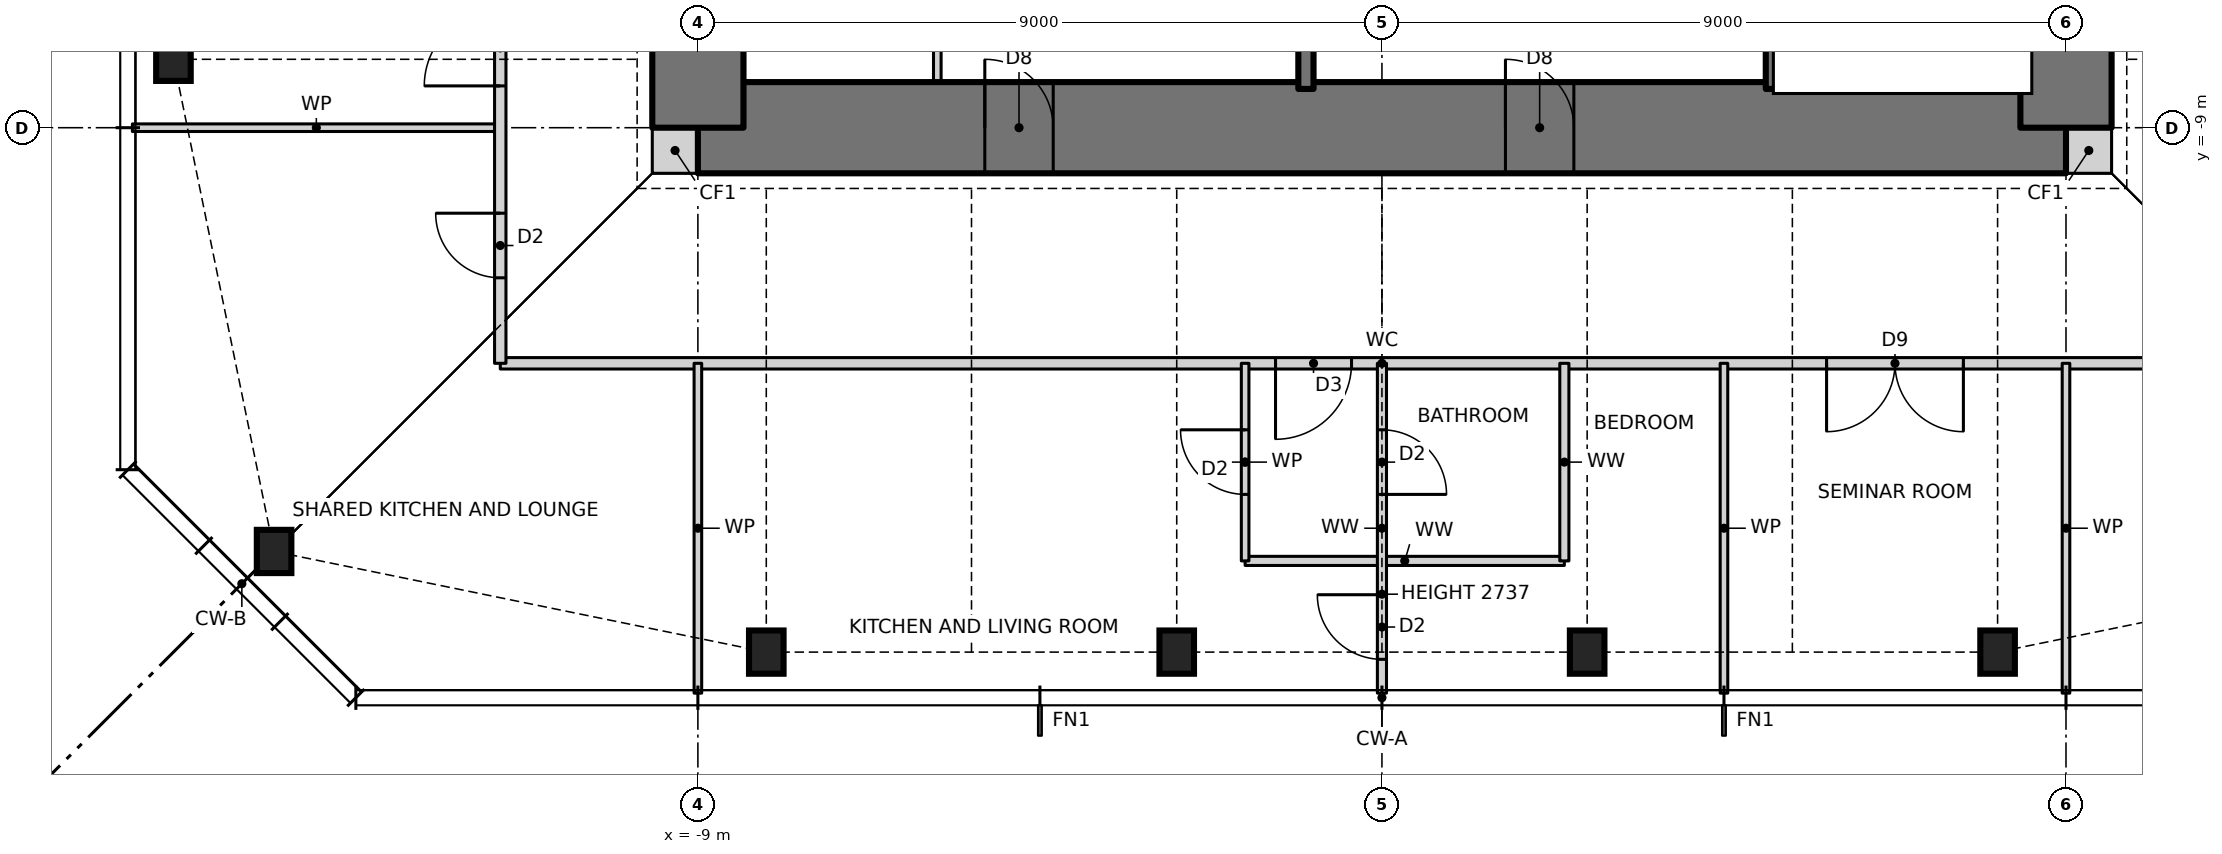
"""IFC4 building model, lengths in metres.
Left out: names, types, materials, properties, quantities, classifications, styles, units other than length and angle.
Written with IfcOpenShell. Run it as: python <this file> out.ifc"""

import sys

from ifc_helpers import new_model, si_unit, direction, frame, frame_2d, origin, origin_2d, place, context, subcontext, project, spatial, rectangle, i_section, extrude, element, fill, save


model = new_model("IFC4")
c1 = context("Model", 3, precision=1e-05, world=origin(), true_north=direction((0.0, 1.0)))
c2 = subcontext(c1, "Body", "Model", "MODEL_VIEW")
j1 = project(units=[si_unit("LENGTHUNIT", "METRE"), si_unit("PLANEANGLEUNIT", "RADIAN")], contexts=[c1])
p1 = place(None, origin())
s1 = spatial("IfcSite", under=j1, at=p1, CompositionType="ELEMENT")
p2 = place(p1, origin())
s2 = spatial("IfcBuilding", under=s1, at=p2, CompositionType="ELEMENT")
p3 = place(p2, frame((0.0, 0.0, 232.5)))
s3 = spatial("IfcBuildingStorey", under=s2, at=p3, CompositionType="ELEMENT", Elevation=232.5)
for number, where, z_axis, x_axis in (
    (1, (-14.576, -14.576, 0.0), (0.0, 0.0, 1.0), (1.0, 0.0, 0.0)),
    (2, (-8.1, -15.9, 0.0), (0.0, 0.0, 1.0), (1.0, 0.0, 0.0)),
    (3, (-2.7, -15.9, 0.0), (0.0, 0.0, 1.0), (1.0, 0.0, 0.0)),
    (4, (2.7, -15.9, 0.0), (0.0, 0.0, 1.0), (1.0, 0.0, 0.0)),
    (5, (8.1, -15.9, 0.0), (0.0, 0.0, 1.0), (1.0, 0.0, 0.0)),
    (6, (-15.9, -8.1, 0.0), (0.0, 0.0, 1.0), (1.0, 0.0, 0.0)),
):
    element("IfcColumn", number, at=place(p3, frame(where, z_axis=z_axis, x_axis=x_axis)), inside=s3, PredefinedType="COLUMN", context=c2, shape_type="SweptSolid", body=[
        extrude(i_section(OverallWidth=0.455, OverallDepth=0.569, WebThickness=0.078, FlangeThickness=0.125, at=origin_2d()), origin(), (0.0, 0.0, 1.0), 3.5),
    ])
for number, where, z_axis, x_axis in (
    (7, (-9.6, -9.3, 0.0), (0.0, 0.0, 1.0), (1.0, 0.0, 0.0)),
    (8, (9.0, -9.3, 0.0), (0.0, 0.0, 1.0), (1.0, 0.0, 0.0)),
):
    element("IfcWall", number, at=place(p3, frame(where, z_axis=z_axis, x_axis=x_axis)), inside=s3, PredefinedType="SOLIDWALL", context=c2, shape_type="SweptSolid", body=[
        extrude(rectangle(XDim=0.6, YDim=0.6, at=frame_2d((0.3, 0.0))), origin(), (0.0, 0.0, 1.0), 3.5),
    ])
p4 = place(p3, frame((-9.0, -9.0, 0.0), z_axis=(0.0, 0.0, 1.0), x_axis=(1.0, 0.0, 0.0)))
e9 = element("IfcWall", 9, at=p4, inside=s3, PredefinedType="SHEAR", context=c2, shape_type="SweptSolid", body=[
    extrude(rectangle(XDim=18.0, YDim=1.2, at=frame_2d((9.0, 0.0))), origin(), (0.0, 0.0, 1.0), 3.5),
])
p5 = place(p4, frame((3.775, 0.0, 0.0)))
e10 = element("IfcOpeningElement", 10, at=p5, cuts=e9, PredefinedType="OPENING", context=c2, shape_type="SweptSolid", body=[
    extrude(rectangle(XDim=0.9, YDim=2.1, at=frame_2d((0.45, 1.05))), frame((0.0, 0.61, 0.0), z_axis=(0.0, -1.0, 0.0), x_axis=(1.0, 0.0, 0.0)), (0.0, 0.0, 1.0), 1.22),
])
p6 = place(p4, frame((10.625, 0.0, 0.0)))
e11 = element("IfcOpeningElement", 11, at=p6, cuts=e9, PredefinedType="OPENING", context=c2, shape_type="SweptSolid", body=[
    extrude(rectangle(XDim=0.9, YDim=2.1, at=frame_2d((0.45, 1.05))), frame((0.0, 0.61, 0.0), z_axis=(0.0, -1.0, 0.0), x_axis=(1.0, 0.0, 0.0)), (0.0, 0.0, 1.0), 1.22),
])
p7 = place(p3, frame((9.0, -9.0, 0.0), z_axis=(0.0, 0.0, 1.0), x_axis=(0.0, 1.0, 0.0)))
e12 = element("IfcWall", 12, at=p7, inside=s3, PredefinedType="SHEAR", context=c2, shape_type="SweptSolid", body=[
    extrude(rectangle(XDim=18.0, YDim=1.2, at=frame_2d((9.0, 0.0))), origin(), (0.0, 0.0, 1.0), 3.5),
])
p8 = place(p7, frame((8.5, 0.0, 0.0)))
e13 = element("IfcOpeningElement", 13, at=p8, cuts=e12, PredefinedType="OPENING", context=c2, shape_type="SweptSolid", body=[
    extrude(rectangle(XDim=1.0, YDim=2.1, at=frame_2d((0.5, 1.05))), frame((0.0, 0.61, 0.0), z_axis=(0.0, -1.0, 0.0), x_axis=(1.0, 0.0, 0.0)), (0.0, 0.0, 1.0), 1.22),
])
p9 = place(p3, frame((-9.0, 9.0, 0.0), z_axis=(0.0, 0.0, 1.0), x_axis=(0.0, -1.0, 0.0)))
e14 = element("IfcWall", 14, at=p9, inside=s3, PredefinedType="SHEAR", context=c2, shape_type="SweptSolid", body=[
    extrude(rectangle(XDim=18.0, YDim=1.2, at=frame_2d((9.0, 0.0))), origin(), (0.0, 0.0, 1.0), 3.5),
])
p10 = place(p9, frame((8.5, 0.0, 0.0)))
e15 = element("IfcOpeningElement", 15, at=p10, cuts=e14, PredefinedType="OPENING", context=c2, shape_type="SweptSolid", body=[
    extrude(rectangle(XDim=1.0, YDim=2.1, at=frame_2d((0.5, 1.05))), frame((0.0, 0.61, 0.0), z_axis=(0.0, -1.0, 0.0), x_axis=(1.0, 0.0, 0.0)), (0.0, 0.0, 1.0), 1.22),
])
p11 = place(p3, frame((-1.8, -14.7, 0.0), z_axis=(0.0, 0.0, 1.0), x_axis=(1.0, 0.0, 0.0)))
e16 = element("IfcWall", 16, at=p11, inside=s3, PredefinedType="PARTITIONING", context=c2, shape_type="SweptSolid", body=[
    extrude(rectangle(XDim=4.2, YDim=0.12, at=frame_2d((2.1, 0.0))), origin(), (0.0, 0.0, 1.0), 3.27),
])
p12 = place(p3, frame((-11.6, -12.1, 0.0), z_axis=(0.0, 0.0, 1.0), x_axis=(1.0, 0.0, 0.0)))
e17 = element("IfcWall", 17, at=p12, inside=s3, PredefinedType="PARTITIONING", context=c2, shape_type="SweptSolid", body=[
    extrude(rectangle(XDim=23.2, YDim=0.15, at=frame_2d((11.6, 0.0))), origin(), (0.0, 0.0, 1.0), 3.27),
])
p13 = place(p12, frame((10.2, 0.0, 0.0)))
e18 = element("IfcOpeningElement", 18, at=p13, cuts=e17, PredefinedType="OPENING", context=c2, shape_type="SweptSolid", body=[
    extrude(rectangle(XDim=1.0, YDim=2.1, at=frame_2d((0.5, 1.05))), frame((0.0, 0.085, 0.0), z_axis=(0.0, -1.0, 0.0), x_axis=(1.0, 0.0, 0.0)), (0.0, 0.0, 1.0), 0.17),
])
p14 = place(p12, frame((17.45, 0.0, 0.0)))
e19 = element("IfcOpeningElement", 19, at=p14, cuts=e17, PredefinedType="OPENING", context=c2, shape_type="SweptSolid", body=[
    extrude(rectangle(XDim=1.8, YDim=2.1, at=frame_2d((0.9, 1.05))), frame((0.0, 0.085, 0.0), z_axis=(0.0, -1.0, 0.0), x_axis=(1.0, 0.0, 0.0)), (0.0, 0.0, 1.0), 0.17),
])
p15 = place(p3, frame((-16.44, -9.0, 0.0), z_axis=(0.0, 0.0, 1.0), x_axis=(1.0, 0.0, 0.0)))
e20 = element("IfcWall", 20, at=p15, inside=s3, PredefinedType="PARTITIONING", context=c2, shape_type="SweptSolid", body=[
    extrude(rectangle(XDim=4.84, YDim=0.1, at=frame_2d((2.42, 0.0))), origin(), (0.0, 0.0, 1.0), 3.27),
])
p16 = place(p3, frame((9.0, -16.44, 0.0), z_axis=(0.0, 0.0, 1.0), x_axis=(0.0, 1.0, 0.0)))
e21 = element("IfcWall", 21, at=p16, inside=s3, PredefinedType="PARTITIONING", context=c2, shape_type="SweptSolid", body=[
    extrude(rectangle(XDim=4.34, YDim=0.1, at=frame_2d((2.17, 0.0))), origin(), (0.0, 0.0, 1.0), 3.27),
])
p17 = place(p3, frame((5.15, -8.49, 0.0), z_axis=(0.0, 0.0, 1.0), x_axis=(0.0, 1.0, 0.0)))
e22 = element("IfcWall", 22, at=p17, inside=s3, PredefinedType="SOLIDWALL", context=c2, shape_type="SweptSolid", body=[
    extrude(rectangle(XDim=13.09, YDim=0.2, at=frame_2d((6.545, 0.0))), origin(), (0.0, 0.0, 1.0), 3.5),
])
p18 = place(p17, frame((7.89, 0.0, 0.0)))
e23 = element("IfcOpeningElement", 23, at=p18, cuts=e22, PredefinedType="OPENING", context=c2, shape_type="SweptSolid", body=[
    extrude(rectangle(XDim=1.2, YDim=2.1, at=frame_2d((0.6, 1.05))), frame((0.0, 0.11, 0.0), z_axis=(0.0, -1.0, 0.0), x_axis=(1.0, 0.0, 0.0)), (0.0, 0.0, 1.0), 0.22),
])
p19 = place(p3, frame((4.5, -16.44, 0.0), z_axis=(0.0, 0.0, 1.0), x_axis=(0.0, 1.0, 0.0)))
e24 = element("IfcWall", 24, at=p19, inside=s3, PredefinedType="PARTITIONING", context=c2, shape_type="SweptSolid", body=[
    extrude(rectangle(XDim=4.34, YDim=0.1, at=frame_2d((2.17, 0.0))), origin(), (0.0, 0.0, 1.0), 3.27),
])
p20 = place(p3, frame((2.4, -14.7, 0.0), z_axis=(0.0, 0.0, 1.0), x_axis=(0.0, 1.0, 0.0)))
e25 = element("IfcWall", 25, at=p20, inside=s3, PredefinedType="PARTITIONING", context=c2, shape_type="SweptSolid", body=[
    extrude(rectangle(XDim=2.6, YDim=0.12, at=frame_2d((1.3, 0.0))), origin(), (0.0, 0.0, 1.0), 3.27),
])
p21 = place(p3, frame((0.0, -16.44, 0.0), z_axis=(0.0, 0.0, 1.0), x_axis=(0.0, 1.0, 0.0)))
e26 = element("IfcWall", 26, at=p21, inside=s3, PredefinedType="PARTITIONING", context=c2, shape_type="SweptSolid", body=[
    extrude(rectangle(XDim=4.34, YDim=0.12, at=frame_2d((2.17, 0.0))), origin(), (0.0, 0.0, 1.0), 2.737),
])
p22 = place(p21, frame((0.445, 0.0, 0.0)))
e27 = element("IfcOpeningElement", 27, at=p22, cuts=e26, PredefinedType="OPENING", context=c2, shape_type="SweptSolid", body=[
    extrude(rectangle(XDim=0.85, YDim=2.1, at=frame_2d((0.425, 1.05))), frame((0.0, 0.07, 0.0), z_axis=(0.0, -1.0, 0.0), x_axis=(1.0, 0.0, 0.0)), (0.0, 0.0, 1.0), 0.14),
])
p23 = place(p21, frame((2.615, 0.0, 0.0)))
e28 = element("IfcOpeningElement", 28, at=p23, cuts=e26, PredefinedType="OPENING", context=c2, shape_type="SweptSolid", body=[
    extrude(rectangle(XDim=0.85, YDim=2.1, at=frame_2d((0.425, 1.05))), frame((0.0, 0.07, 0.0), z_axis=(0.0, -1.0, 0.0), x_axis=(1.0, 0.0, 0.0)), (0.0, 0.0, 1.0), 0.14),
])
p24 = place(p3, frame((-1.0, -8.49, 0.0), z_axis=(0.0, 0.0, 1.0), x_axis=(0.0, 1.0, 0.0)))
e29 = element("IfcWall", 29, at=p24, inside=s3, PredefinedType="SOLIDWALL", context=c2, shape_type="SweptSolid", body=[
    extrude(rectangle(XDim=4.09, YDim=0.2, at=frame_2d((2.045, 0.0))), origin(), (0.0, 0.0, 1.0), 3.5),
])
p25 = place(p3, frame((-1.8, -14.7, 0.0), z_axis=(0.0, 0.0, 1.0), x_axis=(0.0, 1.0, 0.0)))
e30 = element("IfcWall", 30, at=p25, inside=s3, PredefinedType="PARTITIONING", context=c2, shape_type="SweptSolid", body=[
    extrude(rectangle(XDim=2.6, YDim=0.1, at=frame_2d((1.3, 0.0))), origin(), (0.0, 0.0, 1.0), 3.27),
])
p26 = place(p25, frame((0.875, 0.0, 0.0)))
e31 = element("IfcOpeningElement", 31, at=p26, cuts=e30, PredefinedType="OPENING", context=c2, shape_type="SweptSolid", body=[
    extrude(rectangle(XDim=0.85, YDim=2.1, at=frame_2d((0.425, 1.05))), frame((0.0, 0.06, 0.0), z_axis=(0.0, -1.0, 0.0), x_axis=(1.0, 0.0, 0.0)), (0.0, 0.0, 1.0), 0.12),
])
p27 = place(p3, frame((-5.85, -8.49, 0.0), z_axis=(0.0, 0.0, 1.0), x_axis=(0.0, 1.0, 0.0)))
e32 = element("IfcWall", 32, at=p27, inside=s3, PredefinedType="PARTITIONING", context=c2, shape_type="SweptSolid", body=[
    extrude(rectangle(XDim=4.09, YDim=0.1, at=frame_2d((2.045, 0.0))), origin(), (0.0, 0.0, 1.0), 3.3),
])
p28 = place(p27, frame((1.595, 0.0, 0.0)))
e33 = element("IfcOpeningElement", 33, at=p28, cuts=e32, PredefinedType="OPENING", context=c2, shape_type="SweptSolid", body=[
    extrude(rectangle(XDim=0.9, YDim=2.1, at=frame_2d((0.45, 1.05))), frame((0.0, 0.06, 0.0), z_axis=(0.0, -1.0, 0.0), x_axis=(1.0, 0.0, 0.0)), (0.0, 0.0, 1.0), 0.12),
])
p29 = place(p3, frame((-9.0, -16.44, 0.0), z_axis=(0.0, 0.0, 1.0), x_axis=(0.0, 1.0, 0.0)))
e34 = element("IfcWall", 34, at=p29, inside=s3, PredefinedType="PARTITIONING", context=c2, shape_type="SweptSolid", body=[
    extrude(rectangle(XDim=4.34, YDim=0.1, at=frame_2d((2.17, 0.0))), origin(), (0.0, 0.0, 1.0), 3.27),
])
p30 = place(p3, frame((-11.6, -12.1, 0.0), z_axis=(0.0, 0.0, 1.0), x_axis=(0.0, 1.0, 0.0)))
e35 = element("IfcWall", 35, at=p30, inside=s3, PredefinedType="PARTITIONING", context=c2, shape_type="SweptSolid", body=[
    extrude(rectangle(XDim=23.7, YDim=0.15, at=frame_2d((11.85, 0.0))), origin(), (0.0, 0.0, 1.0), 3.27),
])
p31 = place(p30, frame((12.5, 0.0, 0.0)))
e36 = element("IfcOpeningElement", 36, at=p31, cuts=e35, PredefinedType="OPENING", context=c2, shape_type="SweptSolid", body=[
    extrude(rectangle(XDim=1.0, YDim=2.1, at=frame_2d((0.5, 1.05))), frame((0.0, 0.085, 0.0), z_axis=(0.0, -1.0, 0.0), x_axis=(1.0, 0.0, 0.0)), (0.0, 0.0, 1.0), 0.17),
])
p32 = place(p30, frame((3.65, 0.0, 0.0)))
e37 = element("IfcOpeningElement", 37, at=p32, cuts=e35, PredefinedType="OPENING", context=c2, shape_type="SweptSolid", body=[
    extrude(rectangle(XDim=1.0, YDim=2.1, at=frame_2d((0.5, 1.05))), frame((0.0, 0.085, 0.0), z_axis=(0.0, -1.0, 0.0), x_axis=(1.0, 0.0, 0.0)), (0.0, 0.0, 1.0), 0.17),
])
p33 = place(p30, frame((1.125, 0.0, 0.0)))
e38 = element("IfcOpeningElement", 38, at=p33, cuts=e35, PredefinedType="OPENING", context=c2, shape_type="SweptSolid", body=[
    extrude(rectangle(XDim=0.85, YDim=2.1, at=frame_2d((0.425, 1.05))), frame((0.0, 0.085, 0.0), z_axis=(0.0, -1.0, 0.0), x_axis=(1.0, 0.0, 0.0)), (0.0, 0.0, 1.0), 0.17),
])
p34 = place(p13, frame((1.0, 0.0, 0.0), z_axis=(0.0, 0.0, 1.0), x_axis=(-1.0, 0.0, 0.0)))
e39 = element("IfcDoor", 39, at=p34, inside=s3, OperationType="SINGLE_SWING_RIGHT", PredefinedType="DOOR", context=c2, shape_type="SweptSolid", body=[
    extrude(rectangle(XDim=1.0, YDim=2.1, at=frame_2d((0.5, 1.05))), frame((0.0, 0.025, 0.0), z_axis=(0.0, -1.0, 0.0), x_axis=(1.0, 0.0, 0.0)), (0.0, 0.0, 1.0), 0.05),
])
fill(e18, e39)
p35 = place(p26, origin())
e40 = element("IfcDoor", 40, at=p35, inside=s3, OperationType="SINGLE_SWING_RIGHT", PredefinedType="DOOR", context=c2, shape_type="SweptSolid", body=[
    extrude(rectangle(XDim=0.85, YDim=2.1, at=frame_2d((0.425, 1.05))), frame((0.0, 0.025, 0.0), z_axis=(0.0, -1.0, 0.0), x_axis=(1.0, 0.0, 0.0)), (0.0, 0.0, 1.0), 0.05),
])
fill(e31, e40)
p36 = place(p22, origin())
e41 = element("IfcDoor", 41, at=p36, inside=s3, OperationType="SINGLE_SWING_RIGHT", PredefinedType="DOOR", context=c2, shape_type="SweptSolid", body=[
    extrude(rectangle(XDim=0.85, YDim=2.1, at=frame_2d((0.425, 1.05))), frame((0.0, 0.025, 0.0), z_axis=(0.0, -1.0, 0.0), x_axis=(1.0, 0.0, 0.0)), (0.0, 0.0, 1.0), 0.05),
])
fill(e27, e41)
p37 = place(p23, frame((0.85, 0.0, 0.0), z_axis=(0.0, 0.0, 1.0), x_axis=(-1.0, 0.0, 0.0)))
e42 = element("IfcDoor", 42, at=p37, inside=s3, OperationType="SINGLE_SWING_RIGHT", PredefinedType="DOOR", context=c2, shape_type="SweptSolid", body=[
    extrude(rectangle(XDim=0.85, YDim=2.1, at=frame_2d((0.425, 1.05))), frame((0.0, 0.025, 0.0), z_axis=(0.0, -1.0, 0.0), x_axis=(1.0, 0.0, 0.0)), (0.0, 0.0, 1.0), 0.05),
])
fill(e28, e42)
p38 = place(p14, frame((1.8, 0.0, 0.0), z_axis=(0.0, 0.0, 1.0), x_axis=(-1.0, 0.0, 0.0)))
e43 = element("IfcDoor", 43, at=p38, inside=s3, OperationType="DOUBLE_DOOR_SINGLE_SWING", PredefinedType="DOOR", context=c2, shape_type="SweptSolid", body=[
    extrude(rectangle(XDim=1.8, YDim=2.1, at=frame_2d((0.9, 1.05))), frame((0.0, 0.025, 0.0), z_axis=(0.0, -1.0, 0.0), x_axis=(1.0, 0.0, 0.0)), (0.0, 0.0, 1.0), 0.05),
])
fill(e19, e43)
p39 = place(p32, origin())
e44 = element("IfcDoor", 44, at=p39, inside=s3, OperationType="SINGLE_SWING_LEFT", PredefinedType="DOOR", context=c2, shape_type="SweptSolid", body=[
    extrude(rectangle(XDim=1.0, YDim=2.1, at=frame_2d((0.5, 1.05))), frame((0.0, 0.025, 0.0), z_axis=(0.0, -1.0, 0.0), x_axis=(1.0, 0.0, 0.0)), (0.0, 0.0, 1.0), 0.05),
])
fill(e37, e44)
p40 = place(p33, origin())
e45 = element("IfcDoor", 45, at=p40, inside=s3, OperationType="SINGLE_SWING_RIGHT", PredefinedType="DOOR", context=c2, shape_type="SweptSolid", body=[
    extrude(rectangle(XDim=0.85, YDim=2.1, at=frame_2d((0.425, 1.05))), frame((0.0, 0.025, 0.0), z_axis=(0.0, -1.0, 0.0), x_axis=(1.0, 0.0, 0.0)), (0.0, 0.0, 1.0), 0.05),
])
fill(e38, e45)
p41 = place(p5, origin())
e46 = element("IfcDoor", 46, at=p41, inside=s3, OperationType="SINGLE_SWING_LEFT", PredefinedType="DOOR", context=c2, shape_type="SweptSolid", body=[
    extrude(rectangle(XDim=0.9, YDim=2.1, at=frame_2d((0.45, 1.05))), frame((0.0, 0.025, 0.0), z_axis=(0.0, -1.0, 0.0), x_axis=(1.0, 0.0, 0.0)), (0.0, 0.0, 1.0), 0.05),
])
fill(e10, e46)
p42 = place(p6, origin())
e47 = element("IfcDoor", 47, at=p42, inside=s3, OperationType="SINGLE_SWING_LEFT", PredefinedType="DOOR", context=c2, shape_type="SweptSolid", body=[
    extrude(rectangle(XDim=0.9, YDim=2.1, at=frame_2d((0.45, 1.05))), frame((0.0, 0.025, 0.0), z_axis=(0.0, -1.0, 0.0), x_axis=(1.0, 0.0, 0.0)), (0.0, 0.0, 1.0), 0.05),
])
fill(e11, e47)
save(model, sys.argv[1])
